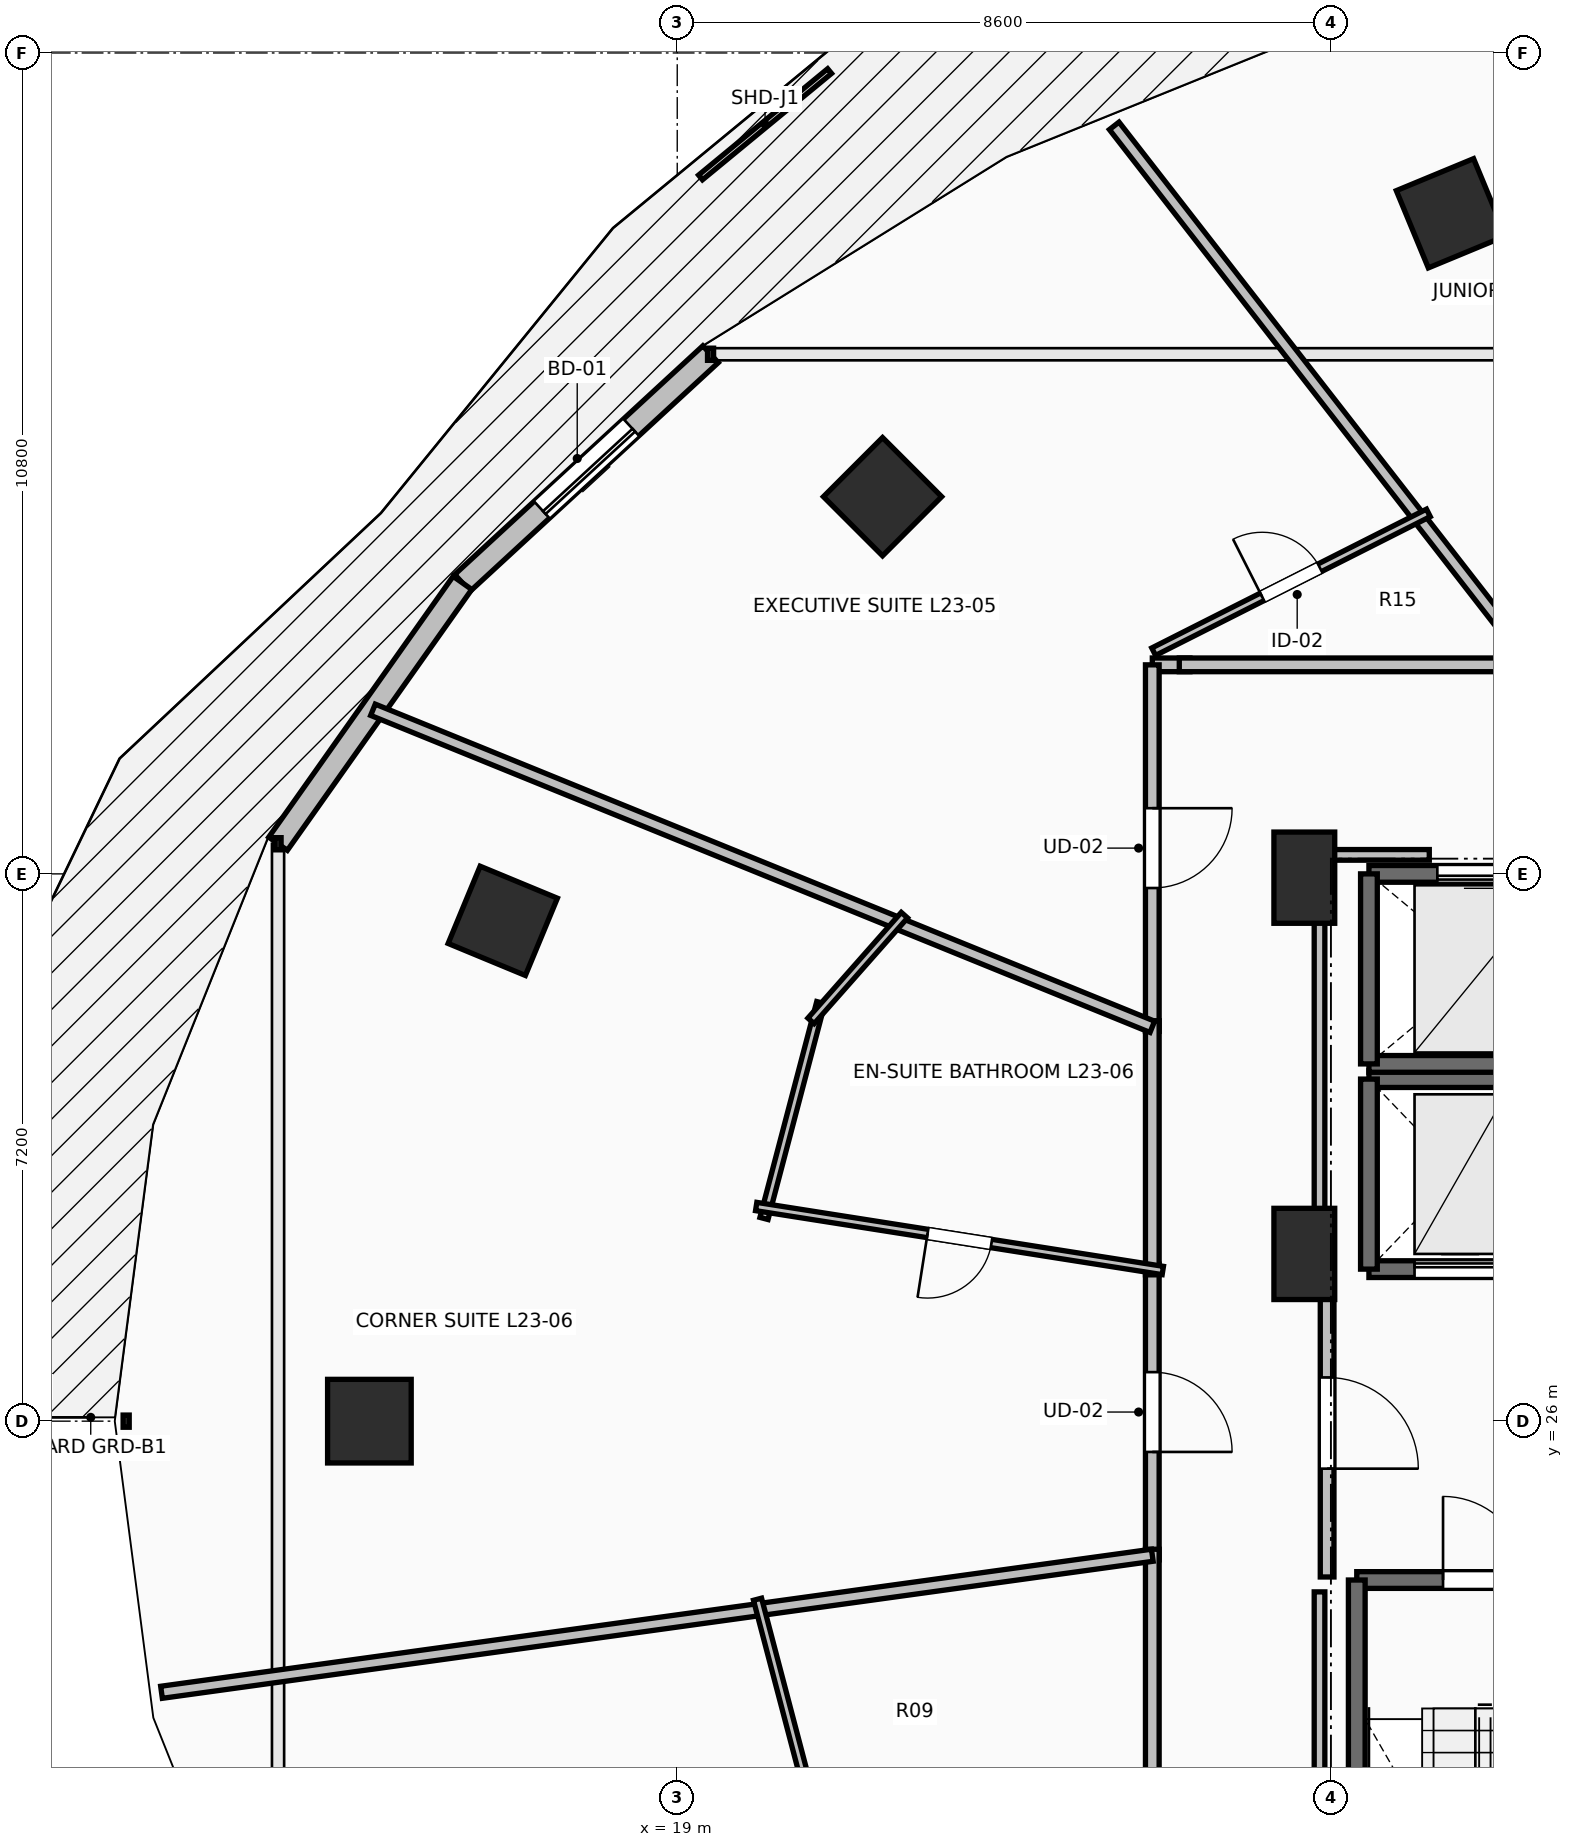
"""IFC4 building model, lengths in metres.
Left out: names, types, materials, properties, quantities, classifications, styles, units other than length and angle.
Written with IfcOpenShell. Run it as: python <this file> out.ifc"""

import sys

from ifc_helpers import new_model, si_unit, direction, frame, frame_2d, origin, origin_2d, place, context, subcontext, project, spatial, rectangle, extrude, element, fill, save


model = new_model("IFC4")
c1 = context("Model", 3, precision=1e-05, world=origin(), true_north=direction((0.0, 1.0)))
c2 = subcontext(c1, "Body", "Model", "MODEL_VIEW")
j1 = project(units=[si_unit("LENGTHUNIT", "METRE"), si_unit("PLANEANGLEUNIT", "RADIAN")], contexts=[c1])
p1 = place(None, origin())
s1 = spatial("IfcSite", under=j1, at=p1, CompositionType="ELEMENT")
p2 = place(p1, origin())
s2 = spatial("IfcBuilding", under=s1, at=p2, CompositionType="ELEMENT")
p3 = place(p2, frame((0.0, 0.0, 89.3)))
s3 = spatial("IfcBuildingStorey", under=s2, at=p3, CompositionType="ELEMENT", Elevation=89.3)
for number, where, z_axis, x_axis in (
    (1, (29.179, 41.891, 0.0), (0.0, 0.0, 1.0), (-0.383, 0.924, 0.0)),
    (2, (21.701, 38.162, 0.0), (0.0, 0.0, 1.0), (-0.707, 0.707, 0.0)),
    (3, (16.705, 32.582, 0.0), (0.0, 0.0, 1.0), (-0.924, 0.383, 0.0)),
    (4, (14.95, 26.0, 0.0), (0.0, 0.0, 1.0), (-1.0, 0.0, 0.0)),
):
    element("IfcColumn", number, at=place(p3, frame(where, z_axis=z_axis, x_axis=x_axis)), inside=s3, PredefinedType="COLUMN", context=c2, shape_type="SweptSolid", body=[
        extrude(rectangle(XDim=1.1, YDim=1.1, at=origin_2d()), origin(), (0.0, 0.0, 1.0), 3.5),
    ])
for number, where, z_axis, x_axis in (
    (5, (27.25, 28.2, 0.0), (0.0, 0.0, 1.0), (1.0, 0.0, 0.0)),
    (6, (27.25, 33.15, 0.0), (0.0, 0.0, 1.0), (1.0, 0.0, 0.0)),
):
    element("IfcColumn", number, at=place(p3, frame(where, z_axis=z_axis, x_axis=x_axis)), inside=s3, PredefinedType="PILASTER", context=c2, shape_type="SweptSolid", body=[
        extrude(rectangle(XDim=0.8, YDim=1.2, at=origin_2d()), origin(), (0.0, 0.0, 1.0), 3.5),
    ])
p4 = place(p3, frame((19.438, 40.036, 0.0), z_axis=(0.0, 0.0, 1.0), x_axis=(-0.735416718093, -0.677615119924, 0.0)))
e7 = element("IfcWall", 7, at=p4, inside=s3, PredefinedType="STANDARD", context=c2, shape_type="SweptSolid", body=[
    extrude(rectangle(XDim=4.439, YDim=0.3, at=frame_2d((2.22, 0.0))), origin(), (0.0, 0.0, 1.0), 3.24),
])
p5 = place(p4, frame((1.419, 0.0, 0.0)))
e8 = element("IfcOpeningElement", 8, at=p5, cuts=e7, PredefinedType="OPENING", context=c2, shape_type="SweptSolid", body=[
    extrude(rectangle(XDim=1.6, YDim=2.3, at=frame_2d((0.8, 1.15))), frame((0.0, 0.165, 0.0), z_axis=(0.0, -1.0, 0.0), x_axis=(1.0, 0.0, 0.0)), (0.0, 0.0, 1.0), 0.33),
])
p6 = place(p3, frame((16.174, 37.028, 0.0), z_axis=(0.0, 0.0, 1.0), x_axis=(-0.57716435238, -0.81662801222, 0.0)))
e9 = element("IfcWall", 9, at=p6, inside=s3, PredefinedType="STANDARD", context=c2, shape_type="SweptSolid", body=[
    extrude(rectangle(XDim=4.202, YDim=0.3, at=frame_2d((2.101, 0.0))), origin(), (0.0, 0.0, 1.0), 3.24),
])
p7 = place(p3, frame((27.94, 23.91, 0.0), z_axis=(0.0, 0.0, 1.0), x_axis=(1.0, 0.0, 0.0)))
e10 = element("IfcWall", 10, at=p7, inside=s3, PredefinedType="SOLIDWALL", context=c2, shape_type="SweptSolid", body=[
    extrude(rectangle(XDim=3.37, YDim=0.22, at=frame_2d((1.685, 0.0))), origin(), (0.0, 0.0, 1.0), 3.24),
])
p8 = place(p7, frame((1.135, 0.0, 0.0)))
e11 = element("IfcOpeningElement", 11, at=p8, cuts=e10, PredefinedType="OPENING", context=c2, shape_type="SweptSolid", body=[
    extrude(rectangle(XDim=1.1, YDim=2.15, at=frame_2d((0.55, 1.075))), frame((0.0, 0.125, 0.0), z_axis=(0.0, -1.0, 0.0), x_axis=(1.0, 0.0, 0.0)), (0.0, 0.0, 1.0), 0.25),
])
p9 = place(p3, frame((27.94, 16.49, 0.0), z_axis=(0.0, 0.0, 1.0), x_axis=(0.0, 1.0, 0.0)))
e12 = element("IfcWall", 12, at=p9, inside=s3, PredefinedType="SOLIDWALL", context=c2, shape_type="SweptSolid", body=[
    extrude(rectangle(XDim=7.42, YDim=0.22, at=frame_2d((3.71, 0.0))), origin(), (0.0, 0.0, 1.0), 3.24),
])
p10 = place(p3, frame((28.1, 28.0, 0.0), z_axis=(0.0, 0.0, 1.0), x_axis=(1.0, 0.0, 0.0)))
e13 = element("IfcWall", 13, at=p10, inside=s3, PredefinedType="SHEAR", context=c2, shape_type="SweptSolid", body=[
    extrude(rectangle(XDim=2.4, YDim=0.22, at=frame_2d((1.2, 0.0))), origin(), (0.0, 0.0, 1.0), 3.24),
])
p11 = place(p10, frame((0.6, 0.0, 0.0)))
e14 = element("IfcOpeningElement", 14, at=p11, cuts=e13, PredefinedType="OPENING", context=c2, shape_type="SweptSolid", body=[
    extrude(rectangle(XDim=1.2, YDim=2.2, at=frame_2d((0.6, 1.1))), frame((0.0, 0.125, 0.0), z_axis=(0.0, -1.0, 0.0), x_axis=(1.0, 0.0, 0.0)), (0.0, 0.0, 1.0), 0.25),
])
p12 = place(p3, frame((30.5, 30.5, 0.0), z_axis=(0.0, 0.0, 1.0), x_axis=(-1.0, 0.0, 0.0)))
e15 = element("IfcWall", 15, at=p12, inside=s3, PredefinedType="SHEAR", context=c2, shape_type="SweptSolid", body=[
    extrude(rectangle(XDim=2.4, YDim=0.22, at=frame_2d((1.2, 0.0))), origin(), (0.0, 0.0, 1.0), 3.24),
])
p13 = place(p3, frame((28.1, 30.5, 0.0), z_axis=(0.0, 0.0, 1.0), x_axis=(0.0, -1.0, 0.0)))
e16 = element("IfcWall", 16, at=p13, inside=s3, PredefinedType="SHEAR", context=c2, shape_type="SweptSolid", body=[
    extrude(rectangle(XDim=2.5, YDim=0.22, at=frame_2d((1.25, 0.0))), origin(), (0.0, 0.0, 1.0), 3.24),
])
p14 = place(p3, frame((28.1, 30.7, 0.0), z_axis=(0.0, 0.0, 1.0), x_axis=(1.0, 0.0, 0.0)))
e17 = element("IfcWall", 17, at=p14, inside=s3, PredefinedType="SOLIDWALL", context=c2, shape_type="SweptSolid", body=[
    extrude(rectangle(XDim=3.0, YDim=0.22, at=frame_2d((1.5, 0.0))), origin(), (0.0, 0.0, 1.0), 3.24),
])
p15 = place(p3, frame((31.1, 33.2, 0.0), z_axis=(0.0, 0.0, 1.0), x_axis=(-1.0, 0.0, 0.0)))
e18 = element("IfcWall", 18, at=p15, inside=s3, PredefinedType="SOLIDWALL", context=c2, shape_type="SweptSolid", body=[
    extrude(rectangle(XDim=3.0, YDim=0.22, at=frame_2d((1.5, 0.0))), origin(), (0.0, 0.0, 1.0), 3.24),
])
p16 = place(p15, frame((0.9, 0.0, 0.0)))
e19 = element("IfcOpeningElement", 19, at=p16, cuts=e18, PredefinedType="OPENING", context=c2, shape_type="SweptSolid", body=[
    extrude(rectangle(XDim=1.2, YDim=2.2, at=frame_2d((0.6, 1.1))), frame((0.0, 0.125, 0.0), z_axis=(0.0, -1.0, 0.0), x_axis=(1.0, 0.0, 0.0)), (0.0, 0.0, 1.0), 0.25),
])
p17 = place(p3, frame((28.1, 33.2, 0.0), z_axis=(0.0, 0.0, 1.0), x_axis=(0.0, -1.0, 0.0)))
e20 = element("IfcWall", 20, at=p17, inside=s3, PredefinedType="SOLIDWALL", context=c2, shape_type="SweptSolid", body=[
    extrude(rectangle(XDim=2.5, YDim=0.22, at=frame_2d((1.25, 0.0))), origin(), (0.0, 0.0, 1.0), 3.24),
])
p18 = place(p3, frame((27.55, 28.0, 0.0), z_axis=(0.0, 0.0, 1.0), x_axis=(0.0, -1.0, 0.0)))
e21 = element("IfcWall", 21, at=p18, inside=s3, PredefinedType="PARTITIONING", context=c2, shape_type="SweptSolid", body=[
    extrude(rectangle(XDim=4.05, YDim=0.18, at=frame_2d((2.025, 0.0))), origin(), (0.0, 0.0, 1.0), 3.24),
])
p19 = place(p18, frame((1.425, 0.0, 0.0)))
e22 = element("IfcOpeningElement", 22, at=p19, cuts=e21, PredefinedType="OPENING", context=c2, shape_type="SweptSolid", body=[
    extrude(rectangle(XDim=1.2, YDim=2.15, at=frame_2d((0.6, 1.075))), frame((0.0, 0.105, 0.0), z_axis=(0.0, -1.0, 0.0), x_axis=(1.0, 0.0, 0.0)), (0.0, 0.0, 1.0), 0.21),
])
p20 = place(p3, frame((25.745, 35.95, 0.0), z_axis=(0.0, 0.0, 1.0), x_axis=(-1.0, 0.0, 0.0)))
e23 = element("IfcWall", 23, at=p20, inside=s3, PredefinedType="PARTITIONING", context=c2, shape_type="SweptSolid", body=[
    extrude(rectangle(XDim=0.495, YDim=0.18, at=frame_2d((0.248, 0.0))), origin(), (0.0, 0.0, 1.0), 3.24),
])
p21 = place(p3, frame((25.25, 35.95, 0.0), z_axis=(0.0, 0.0, 1.0), x_axis=(0.0, -1.0, 0.0)))
e24 = element("IfcWall", 24, at=p21, inside=s3, PredefinedType="PARTITIONING", context=c2, shape_type="SweptSolid", body=[
    extrude(rectangle(XDim=4.822, YDim=0.18, at=frame_2d((2.411, 0.0))), origin(), (0.0, 0.0, 1.0), 2.432),
])
p22 = place(p21, frame((1.886, 0.0, 0.0)))
e25 = element("IfcOpeningElement", 25, at=p22, cuts=e24, PredefinedType="OPENING", context=c2, shape_type="SweptSolid", body=[
    extrude(rectangle(XDim=1.05, YDim=2.2, at=frame_2d((0.525, 1.1))), frame((0.0, 0.105, 0.0), z_axis=(0.0, -1.0, 0.0), x_axis=(1.0, 0.0, 0.0)), (0.0, 0.0, 1.0), 0.21),
])
p23 = place(p3, frame((30.327, 35.95, 0.0), z_axis=(0.0, 0.0, 1.0), x_axis=(-1.0, 0.0, 0.0)))
e26 = element("IfcWall", 26, at=p23, inside=s3, PredefinedType="PARTITIONING", context=c2, shape_type="SweptSolid", body=[
    extrude(rectangle(XDim=4.722, YDim=0.18, at=frame_2d((2.361, 0.0))), origin(), (0.0, 0.0, 1.0), 2.432),
])
p24 = place(p3, frame((25.25, 28.065, 0.0), z_axis=(0.0, 0.0, 1.0), x_axis=(0.0, -1.0, 0.0)))
e27 = element("IfcWall", 27, at=p24, inside=s3, PredefinedType="PARTITIONING", context=c2, shape_type="SweptSolid", body=[
    extrude(rectangle(XDim=3.89, YDim=0.18, at=frame_2d((1.945, 0.0))), origin(), (0.0, 0.0, 1.0), 2.432),
])
p25 = place(p24, frame((1.42, 0.0, 0.0)))
e28 = element("IfcOpeningElement", 28, at=p25, cuts=e27, PredefinedType="OPENING", context=c2, shape_type="SweptSolid", body=[
    extrude(rectangle(XDim=1.05, YDim=2.2, at=frame_2d((0.525, 1.1))), frame((0.0, 0.105, 0.0), z_axis=(0.0, -1.0, 0.0), x_axis=(1.0, 0.0, 0.0)), (0.0, 0.0, 1.0), 0.21),
])
p26 = place(p3, frame((25.25, 31.268, 0.0), z_axis=(0.0, 0.0, 1.0), x_axis=(0.0, -1.0, 0.0)))
e29 = element("IfcWall", 29, at=p26, inside=s3, PredefinedType="PARTITIONING", context=c2, shape_type="SweptSolid", body=[
    extrude(rectangle(XDim=3.343, YDim=0.18, at=frame_2d((1.671, 0.0))), origin(), (0.0, 0.0, 1.0), 2.432),
])
p27 = place(p3, frame((25.25, 24.315, 0.0), z_axis=(0.0, 0.0, 1.0), x_axis=(0.0, -1.0, 0.0)))
e30 = element("IfcWall", 30, at=p27, inside=s3, PredefinedType="PARTITIONING", context=c2, shape_type="SweptSolid", body=[
    extrude(rectangle(XDim=3.308, YDim=0.18, at=frame_2d((1.654, 0.0))), origin(), (0.0, 0.0, 1.0), 3.24),
])
p28 = place(p3, frame((24.749, 43.041, 0.0), z_axis=(0.0, 0.0, 1.0), x_axis=(0.61384652665, -0.789425387051, 0.0)))
e31 = element("IfcWall", 31, at=p28, inside=s3, PredefinedType="PARTITIONING", context=c2, shape_type="SweptSolid", body=[
    extrude(rectangle(XDim=8.983, YDim=0.16, at=frame_2d((4.491, 0.0))), origin(), (0.0, 0.0, 1.0), 2.432),
])
p29 = place(p3, frame((25.268, 36.123, 0.0), z_axis=(0.0, 0.0, 1.0), x_axis=(0.892501687321, 0.451044053425, 0.0)))
e32 = element("IfcWall", 32, at=p29, inside=s3, PredefinedType="PARTITIONING", context=c2, shape_type="SweptSolid", body=[
    extrude(rectangle(XDim=4.049, YDim=0.11, at=frame_2d((2.025, 0.0))), origin(), (0.0, 0.0, 1.0), 2.432),
])
p30 = place(p29, frame((1.6, 0.0, 0.0)))
e33 = element("IfcOpeningElement", 33, at=p30, cuts=e32, PredefinedType="OPENING", context=c2, shape_type="SweptSolid", body=[
    extrude(rectangle(XDim=0.85, YDim=2.1, at=frame_2d((0.425, 1.05))), frame((0.0, 0.07, 0.0), z_axis=(0.0, -1.0, 0.0), x_axis=(1.0, 0.0, 0.0)), (0.0, 0.0, 1.0), 0.14),
])
p31 = place(p3, frame((14.997, 35.359, 0.0), z_axis=(0.0, 0.0, 1.0), x_axis=(0.926288615834, -0.376814808861, 0.0)))
e34 = element("IfcWall", 34, at=p31, inside=s3, PredefinedType="PARTITIONING", context=c2, shape_type="SweptSolid", body=[
    extrude(rectangle(XDim=11.069, YDim=0.16, at=frame_2d((5.534, 0.0))), origin(), (0.0, 0.0, 1.0), 2.677),
])
p32 = place(p3, frame((20.141, 28.667, 0.0), z_axis=(0.0, 0.0, 1.0), x_axis=(0.254489206931, 0.967075614187, 0.0)))
e35 = element("IfcWall", 35, at=p32, inside=s3, PredefinedType="PARTITIONING", context=c2, shape_type="SweptSolid", body=[
    extrude(rectangle(XDim=2.937, YDim=0.11, at=frame_2d((1.468, 0.0))), origin(), (0.0, 0.0, 1.0), 2.432),
])
p33 = place(p3, frame((20.76, 31.266, 0.0), z_axis=(0.0, 0.0, 1.0), x_axis=(0.662008805554, 0.749496058275, 0.0)))
e36 = element("IfcWall", 36, at=p33, inside=s3, PredefinedType="PARTITIONING", context=c2, shape_type="SweptSolid", body=[
    extrude(rectangle(XDim=1.856, YDim=0.11, at=frame_2d((0.928, 0.0))), origin(), (0.0, 0.0, 1.0), 2.922),
])
p34 = place(p3, frame((25.388, 27.982, 0.0), z_axis=(0.0, 0.0, 1.0), x_axis=(-0.98785054141, 0.155406910513, 0.0)))
e37 = element("IfcWall", 37, at=p34, inside=s3, PredefinedType="PARTITIONING", context=c2, shape_type="SweptSolid", body=[
    extrude(rectangle(XDim=5.415, YDim=0.11, at=frame_2d((2.708, 0.0))), origin(), (0.0, 0.0, 1.0), 2.432),
])
p35 = place(p34, frame((2.283, 0.0, 0.0)))
e38 = element("IfcOpeningElement", 38, at=p35, cuts=e37, PredefinedType="OPENING", context=c2, shape_type="SweptSolid", body=[
    extrude(rectangle(XDim=0.85, YDim=2.1, at=frame_2d((0.425, 1.05))), frame((0.0, 0.07, 0.0), z_axis=(0.0, -1.0, 0.0), x_axis=(1.0, 0.0, 0.0)), (0.0, 0.0, 1.0), 0.14),
])
p36 = place(p3, frame((12.215, 22.433, 0.0), z_axis=(0.0, 0.0, 1.0), x_axis=(0.990569013426, 0.137014705927, 0.0)))
e39 = element("IfcWall", 39, at=p36, inside=s3, PredefinedType="PARTITIONING", context=c2, shape_type="SweptSolid", body=[
    extrude(rectangle(XDim=13.159, YDim=0.16, at=frame_2d((6.58, 0.0))), origin(), (0.0, 0.0, 1.0), 2.677),
])
p37 = place(p3, frame((20.889, 20.494, 0.0), z_axis=(0.0, 0.0, 1.0), x_axis=(-0.254405137241, 0.967097733502, 0.0)))
e40 = element("IfcWall", 40, at=p37, inside=s3, PredefinedType="PARTITIONING", context=c2, shape_type="SweptSolid", body=[
    extrude(rectangle(XDim=3.271, YDim=0.11, at=frame_2d((1.636, 0.0))), origin(), (0.0, 0.0, 1.0), 2.922),
])
p38 = place(p3, frame((27.45, 16.24, 0.0), z_axis=(0.0, 0.0, 1.0), x_axis=(0.0, 1.0, 0.0)))
e41 = element("IfcWall", 41, at=p38, inside=s3, PredefinedType="PARTITIONING", context=c2, shape_type="SweptSolid", body=[
    extrude(rectangle(XDim=7.514, YDim=0.14, at=frame_2d((3.757, 0.0))), origin(), (0.0, 0.0, 1.0), 2.432),
])
p39 = place(p3, frame((27.45, 28.196, 0.0), z_axis=(0.0, 0.0, 1.0), x_axis=(0.0, 1.0, 0.0)))
e42 = element("IfcWall", 42, at=p39, inside=s3, PredefinedType="PARTITIONING", context=c2, shape_type="SweptSolid", body=[
    extrude(rectangle(XDim=5.254, YDim=0.14, at=frame_2d((2.627, 0.0))), origin(), (0.0, 0.0, 1.0), 2.432),
])
p40 = place(p3, frame((27.45, 33.45, 0.0), z_axis=(0.0, 0.0, 1.0), x_axis=(1.0, 0.0, 0.0)))
e43 = element("IfcWall", 43, at=p40, inside=s3, PredefinedType="PARTITIONING", context=c2, shape_type="SweptSolid", body=[
    extrude(rectangle(XDim=1.444, YDim=0.14, at=frame_2d((0.722, 0.0))), origin(), (0.0, 0.0, 1.0), 2.432),
])
p41 = place(p5, origin())
e44 = element("IfcDoor", 44, at=p41, inside=s3, OperationType="SLIDING_TO_LEFT", PredefinedType="DOOR", context=c2, shape_type="SweptSolid", body=[
    extrude(rectangle(XDim=1.6, YDim=2.3, at=frame_2d((0.8, 1.15))), frame((0.0, 0.025, 0.0), z_axis=(0.0, -1.0, 0.0), x_axis=(1.0, 0.0, 0.0)), (0.0, 0.0, 1.0), 0.05),
])
fill(e8, e44)
p42 = place(p8, origin())
e45 = element("IfcDoor", 45, at=p42, inside=s3, OperationType="SINGLE_SWING_LEFT", PredefinedType="DOOR", context=c2, shape_type="SweptSolid", body=[
    extrude(rectangle(XDim=1.1, YDim=2.15, at=frame_2d((0.55, 1.075))), frame((0.0, 0.025, 0.0), z_axis=(0.0, -1.0, 0.0), x_axis=(1.0, 0.0, 0.0)), (0.0, 0.0, 1.0), 0.05),
])
fill(e11, e45)
p43 = place(p11, origin())
e46 = element("IfcDoor", 46, at=p43, inside=s3, OperationType="SLIDING_TO_LEFT", PredefinedType="DOOR", context=c2, shape_type="SweptSolid", body=[
    extrude(rectangle(XDim=1.2, YDim=2.2, at=frame_2d((0.6, 1.1))), frame((0.0, 0.025, 0.0), z_axis=(0.0, -1.0, 0.0), x_axis=(1.0, 0.0, 0.0)), (0.0, 0.0, 1.0), 0.05),
])
fill(e14, e46)
p44 = place(p16, origin())
e47 = element("IfcDoor", 47, at=p44, inside=s3, OperationType="SLIDING_TO_LEFT", PredefinedType="DOOR", context=c2, shape_type="SweptSolid", body=[
    extrude(rectangle(XDim=1.2, YDim=2.2, at=frame_2d((0.6, 1.1))), frame((0.0, 0.025, 0.0), z_axis=(0.0, -1.0, 0.0), x_axis=(1.0, 0.0, 0.0)), (0.0, 0.0, 1.0), 0.05),
])
fill(e19, e47)
p45 = place(p19, origin())
e48 = element("IfcDoor", 48, at=p45, inside=s3, OperationType="SINGLE_SWING_RIGHT", PredefinedType="DOOR", context=c2, shape_type="SweptSolid", body=[
    extrude(rectangle(XDim=1.2, YDim=2.15, at=frame_2d((0.6, 1.075))), frame((0.0, 0.025, 0.0), z_axis=(0.0, -1.0, 0.0), x_axis=(1.0, 0.0, 0.0)), (0.0, 0.0, 1.0), 0.05),
])
fill(e22, e48)
p46 = place(p22, origin())
e49 = element("IfcDoor", 49, at=p46, inside=s3, OperationType="SINGLE_SWING_LEFT", PredefinedType="DOOR", context=c2, shape_type="SweptSolid", body=[
    extrude(rectangle(XDim=1.05, YDim=2.2, at=frame_2d((0.525, 1.1))), frame((0.0, 0.025, 0.0), z_axis=(0.0, -1.0, 0.0), x_axis=(1.0, 0.0, 0.0)), (0.0, 0.0, 1.0), 0.05),
])
fill(e25, e49)
p47 = place(p25, origin())
e50 = element("IfcDoor", 50, at=p47, inside=s3, OperationType="SINGLE_SWING_RIGHT", PredefinedType="DOOR", context=c2, shape_type="SweptSolid", body=[
    extrude(rectangle(XDim=1.05, YDim=2.2, at=frame_2d((0.525, 1.1))), frame((0.0, 0.025, 0.0), z_axis=(0.0, -1.0, 0.0), x_axis=(1.0, 0.0, 0.0)), (0.0, 0.0, 1.0), 0.05),
])
fill(e28, e50)
p48 = place(p30, origin())
e51 = element("IfcDoor", 51, at=p48, inside=s3, OperationType="SINGLE_SWING_LEFT", PredefinedType="DOOR", context=c2, shape_type="SweptSolid", body=[
    extrude(rectangle(XDim=0.85, YDim=2.1, at=frame_2d((0.425, 1.05))), frame((0.0, 0.025, 0.0), z_axis=(0.0, -1.0, 0.0), x_axis=(1.0, 0.0, 0.0)), (0.0, 0.0, 1.0), 0.05),
])
fill(e33, e51)
p49 = place(p35, origin())
e52 = element("IfcDoor", 52, at=p49, inside=s3, OperationType="SINGLE_SWING_RIGHT", PredefinedType="DOOR", context=c2, shape_type="SweptSolid", body=[
    extrude(rectangle(XDim=0.85, YDim=2.1, at=frame_2d((0.425, 1.05))), frame((0.0, 0.025, 0.0), z_axis=(0.0, -1.0, 0.0), x_axis=(1.0, 0.0, 0.0)), (0.0, 0.0, 1.0), 0.05),
])
fill(e38, e52)
save(model, sys.argv[1])
